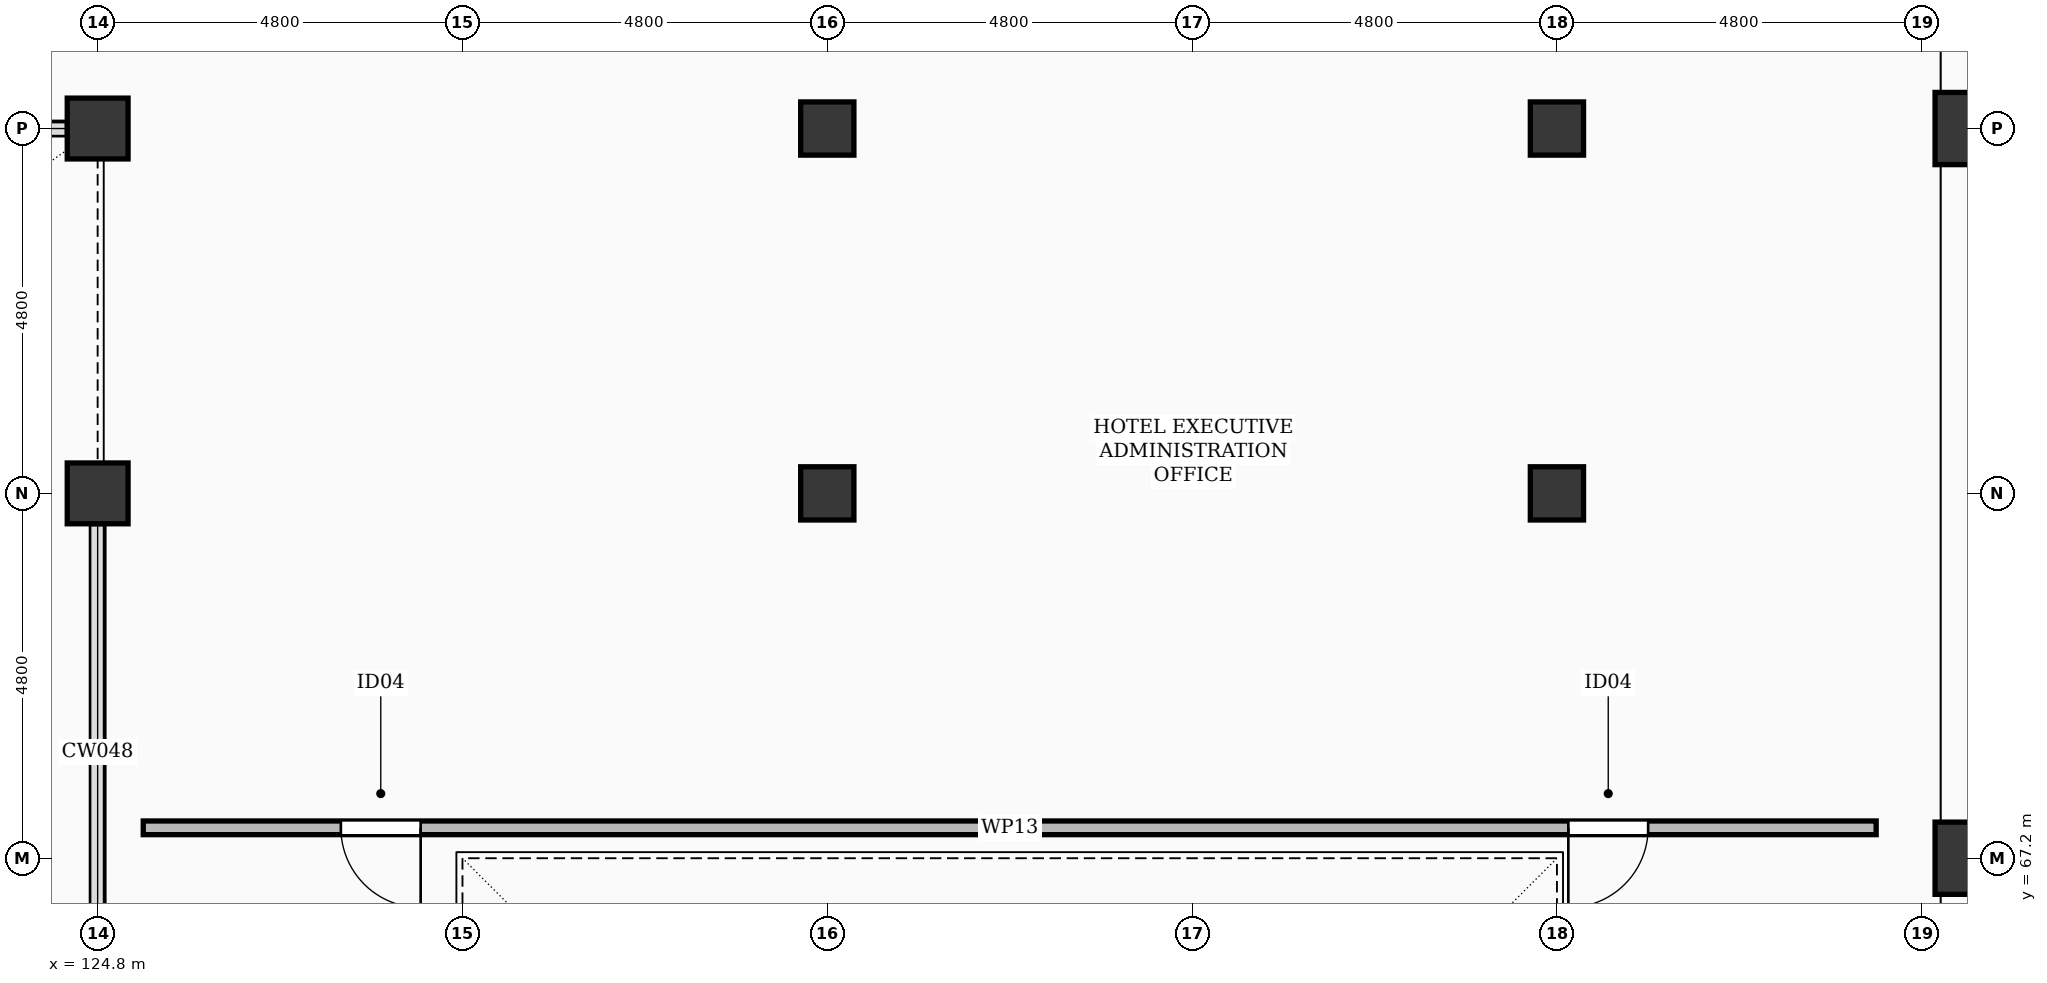
"""IFC4 building model, lengths in metres.
Left out: names, types, materials, properties, quantities, classifications, styles, units other than length and angle.
Written with IfcOpenShell. Run it as: python <this file> out.ifc"""

import sys

from ifc_helpers import new_model, si_unit, direction, frame, frame_2d, origin, origin_2d, place, context, subcontext, project, spatial, rectangle, circle, extrude, element, fill, save


model = new_model("IFC4")
c1 = context("Model", 3, precision=1e-05, world=origin(), true_north=direction((0.0, 1.0)))
c2 = subcontext(c1, "Body", "Model", "MODEL_VIEW")
j1 = project(units=[si_unit("LENGTHUNIT", "METRE"), si_unit("PLANEANGLEUNIT", "RADIAN")], contexts=[c1])
p1 = place(None, origin())
s1 = spatial("IfcSite", under=j1, at=p1, CompositionType="ELEMENT")
p2 = place(p1, origin())
s2 = spatial("IfcBuilding", under=s1, at=p2, CompositionType="ELEMENT")
p3 = place(p2, frame((0.0, 0.0, 11.4)))
s3 = spatial("IfcBuildingStorey", under=s2, at=p3, CompositionType="ELEMENT", Elevation=11.4)
for number, where, z_axis, x_axis in (
    (1, (124.8, 72.0, 0.0), (0.0, 0.0, 1.0), (1.0, 0.0, 0.0)),
    (2, (124.8, 76.8, 0.0), (0.0, 0.0, 1.0), (1.0, 0.0, 0.0)),
):
    element("IfcColumn", number, at=place(p3, frame(where, z_axis=z_axis, x_axis=x_axis)), inside=s3, PredefinedType="COLUMN", context=c2, shape_type="SweptSolid", body=[
        extrude(circle(Radius=0.4, at=origin_2d()), origin(), (0.0, 0.0, 1.0), 4.8),
    ])
for number, where, z_axis, x_axis in (
    (3, (134.4, 72.0, 0.0), (0.0, 0.0, 1.0), (1.0, 0.0, 0.0)),
    (4, (134.4, 76.8, 0.0), (0.0, 0.0, 1.0), (1.0, 0.0, 0.0)),
    (5, (144.0, 72.0, 0.0), (0.0, 0.0, 1.0), (1.0, 0.0, 0.0)),
    (6, (144.0, 76.8, 0.0), (0.0, 0.0, 1.0), (1.0, 0.0, 0.0)),
):
    element("IfcColumn", number, at=place(p3, frame(where, z_axis=z_axis, x_axis=x_axis)), inside=s3, PredefinedType="COLUMN", context=c2, shape_type="SweptSolid", body=[
        extrude(rectangle(XDim=0.7, YDim=0.7, at=origin_2d()), origin(), (0.0, 0.0, 1.0), 4.8),
    ])
for number, where, z_axis, x_axis in (
    (7, (149.45, 67.2, 0.0), (0.0, 0.0, 1.0), (1.0, 0.0, 0.0)),
    (8, (149.45, 76.8, 0.0), (0.0, 0.0, 1.0), (1.0, 0.0, 0.0)),
):
    element("IfcColumn", number, at=place(p3, frame(where, z_axis=z_axis, x_axis=x_axis)), inside=s3, PredefinedType="COLUMN", context=c2, shape_type="SweptSolid", body=[
        extrude(rectangle(XDim=0.95, YDim=0.95, at=origin_2d()), origin(), (0.0, 0.0, 1.0), 4.8),
    ])
p4 = place(p3, frame((125.4, 67.6, 0.0), z_axis=(0.0, 0.0, 1.0), x_axis=(1.0, 0.0, 0.0)))
e9 = element("IfcWall", 9, at=p4, inside=s3, PredefinedType="PARTITIONING", context=c2, shape_type="SweptSolid", body=[
    extrude(rectangle(XDim=22.8, YDim=0.18, at=frame_2d((11.4, 0.0))), origin(), (0.0, 0.0, 1.0), 3.692),
])
p5 = place(p4, frame((2.6, 0.0, 0.0)))
e10 = element("IfcOpeningElement", 10, at=p5, cuts=e9, PredefinedType="OPENING", context=c2, shape_type="SweptSolid", body=[
    extrude(rectangle(XDim=1.05, YDim=2.18, at=frame_2d((0.525, 1.09))), frame((0.0, 0.102, 0.0), z_axis=(0.0, -1.0, 0.0), x_axis=(1.0, 0.0, 0.0)), (0.0, 0.0, 1.0), 0.204),
])
p6 = place(p4, frame((18.75, 0.0, 0.0)))
e11 = element("IfcOpeningElement", 11, at=p6, cuts=e9, PredefinedType="OPENING", context=c2, shape_type="SweptSolid", body=[
    extrude(rectangle(XDim=1.05, YDim=2.18, at=frame_2d((0.525, 1.09))), frame((0.0, 0.102, 0.0), z_axis=(0.0, -1.0, 0.0), x_axis=(1.0, 0.0, 0.0)), (0.0, 0.0, 1.0), 0.204),
])
p7 = place(p5, frame((1.05, 0.0, 0.0), z_axis=(0.0, 0.0, 1.0), x_axis=(-1.0, 0.0, 0.0)))
e12 = element("IfcDoor", 12, at=p7, inside=s3, OperationType="SINGLE_SWING_RIGHT", PredefinedType="DOOR", context=c2, shape_type="SweptSolid", body=[
    extrude(rectangle(XDim=1.05, YDim=2.18, at=frame_2d((0.525, 1.09))), frame((0.0, 0.025, 0.0), z_axis=(0.0, -1.0, 0.0), x_axis=(1.0, 0.0, 0.0)), (0.0, 0.0, 1.0), 0.05),
])
fill(e10, e12)
p8 = place(p6, frame((1.05, 0.0, 0.0), z_axis=(0.0, 0.0, 1.0), x_axis=(-1.0, 0.0, 0.0)))
e13 = element("IfcDoor", 13, at=p8, inside=s3, OperationType="SINGLE_SWING_LEFT", PredefinedType="DOOR", context=c2, shape_type="SweptSolid", body=[
    extrude(rectangle(XDim=1.05, YDim=2.18, at=frame_2d((0.525, 1.09))), frame((0.0, 0.025, 0.0), z_axis=(0.0, -1.0, 0.0), x_axis=(1.0, 0.0, 0.0)), (0.0, 0.0, 1.0), 0.05),
])
fill(e11, e13)
save(model, sys.argv[1])
